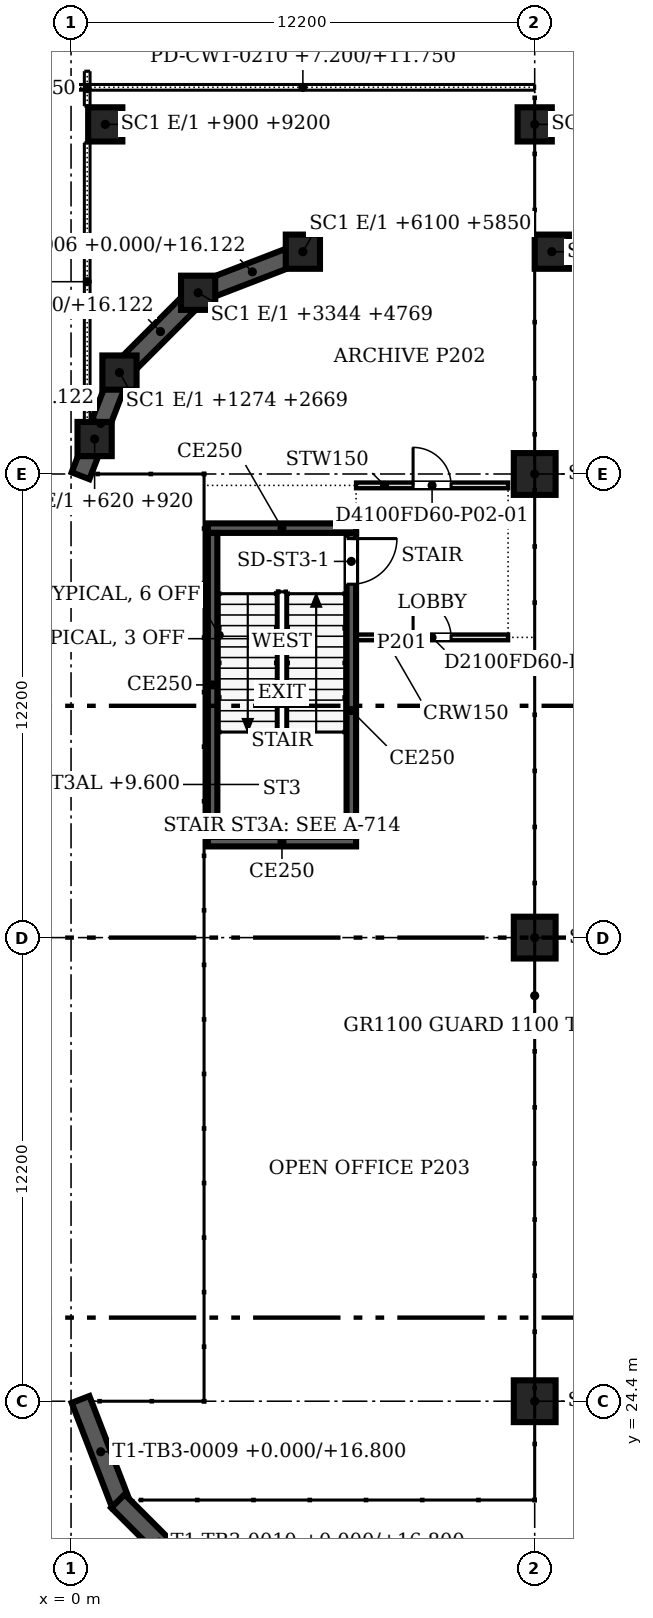
"""IFC4 building model, lengths in metres.
Left out: names, types, materials, properties, quantities, classifications, styles, units other than length and angle.
Written with IfcOpenShell. Run it as: python <this file> out.ifc"""

import sys

from ifc_helpers import new_model, si_unit, direction, frame, frame_2d, origin, origin_2d, place, context, subcontext, project, spatial, polyline, rectangle, outline, extrude, faceted_brep, source, transform, mapped, element, fill, save


model = new_model("IFC4")
c1 = context("Model", 3, precision=1e-05, world=origin(), true_north=direction((0.0, 1.0)))
c2 = subcontext(c1, "Body", "Model", "MODEL_VIEW")
j1 = project(units=[si_unit("LENGTHUNIT", "METRE"), si_unit("PLANEANGLEUNIT", "RADIAN")], contexts=[c1])
p1 = place(None, origin())
s1 = spatial("IfcSite", under=j1, at=p1, CompositionType="ELEMENT")
p2 = place(p1, origin())
s2 = spatial("IfcBuilding", under=s1, at=p2, CompositionType="ELEMENT")
p3 = place(p2, frame((0.0, 0.0, 7.2)))
s3 = spatial("IfcBuildingStorey", under=s2, at=p3, CompositionType="ELEMENT", Elevation=7.2)
for number, where, z_axis, x_axis in (
    (1, (12.65, 54.65, 0.0), (0.0, 0.0, 1.0), (1.0, 0.0, 0.0)),
    (2, (6.1, 54.65, 0.0), (0.0, 0.0, 1.0), (1.0, 0.0, 0.0)),
    (3, (3.344, 53.569, 0.0), (0.0, 0.0, 1.0), (1.0, 0.0, 0.0)),
    (4, (1.274, 51.469, 0.0), (0.0, 0.0, 1.0), (1.0, 0.0, 0.0)),
):
    element("IfcColumn", number, at=place(p3, frame(where, z_axis=z_axis, x_axis=x_axis)), inside=s3, PredefinedType="COLUMN", context=c2, shape_type="SweptSolid", body=[
        extrude(rectangle(XDim=0.9, YDim=0.9, at=origin_2d()), origin(), (0.0, 0.0, 1.0), 4.55),
    ])
for number, where, z_axis, x_axis in (
    (5, (12.2, 24.4, 0.0), (0.0, 0.0, 1.0), (1.0, 0.0, 0.0)),
    (6, (12.2, 36.6, 0.0), (0.0, 0.0, 1.0), (1.0, 0.0, 0.0)),
    (7, (12.2, 48.8, 0.0), (0.0, 0.0, 1.0), (1.0, 0.0, 0.0)),
):
    element("IfcColumn", number, at=place(p3, frame(where, z_axis=z_axis, x_axis=x_axis)), inside=s3, PredefinedType="COLUMN", context=c2, shape_type="SweptSolid", body=[
        extrude(rectangle(XDim=1.1, YDim=1.1, at=origin_2d()), origin(), (0.0, 0.0, 1.0), 4.55),
    ])
for number, where, z_axis, x_axis in (
    (8, (12.2, 58.0, 0.0), (0.0, 0.0, 1.0), (1.0, 0.0, 0.0)),
    (9, (0.9, 58.0, 0.0), (0.0, 0.0, 1.0), (1.0, 0.0, 0.0)),
    (10, (0.62, 49.72, 0.0), (0.0, 0.0, 1.0), (1.0, 0.0, 0.0)),
):
    element("IfcColumn", number, at=place(p3, frame(where, z_axis=z_axis, x_axis=x_axis)), inside=s3, PredefinedType="COLUMN", context=c2, shape_type="SweptSolid", body=[
        extrude(rectangle(XDim=0.9, YDim=0.9, at=origin_2d()), origin(), (0.0, 0.0, 1.0), 4.55),
    ])
p4 = place(p2, frame((0.0, 0.0, 12.0)))
s4 = spatial("IfcBuildingStorey", under=s2, at=p4, CompositionType="ELEMENT", Elevation=12.0)
m1 = source(origin(), c2, "Body", "Brep", [
    faceted_brep([(0.047, -0.25, 0.0), (6.1, -0.25, 8.4), (0.0, -0.25, 8.4), (0.0, -0.25, 0.066), (0.093, 0.25, 8.4), (6.1, 0.25, 8.4), (0.093, 0.25, 0.065), (0.047, 0.0, 0.0)], [[[0, 1, 2, 3]], [[4, 5, 6]], [[6, 5, 1, 0, 7]], [[5, 4, 2, 1]], [[7, 0, 3]], [[6, 7, 3, 2, 4]]]),
])
p5 = place(p4, frame((0.25, 48.8, -3.6), z_axis=(0.0, 0.0, 1.0), x_axis=(0.0, -1.0, 0.0)))
e11 = element("IfcWall", 11, at=p5, inside=s4, PredefinedType="SOLIDWALL", context=c2, shape_type="MappedRepresentation", body=[
    mapped(m1, transform((0.0, 0.0, 0.0), scale=1.0)),
])
m2 = source(origin(), c2, "Body", "SweptSolid", [
    extrude(outline(polyline([(0.247, 0.705), (5.612, 8.15), (0.247, 8.15), (0.247, 0.705)])), frame((0.0, 0.26, 0.0), z_axis=(0.0, -1.0, 0.0), x_axis=(1.0, 0.0, 0.0)), (0.0, 0.0, 1.0), 0.52),
])
p6 = place(p5, origin())
e12 = element("IfcOpeningElement", 12, at=p6, cuts=e11, PredefinedType="OPENING", context=c2, shape_type="MappedRepresentation", body=[
    mapped(m2, transform((0.0, 0.0, 0.0), scale=1.0)),
])
m3 = source(origin(), c2, "Body", "SweptSolid", [
    extrude(outline(polyline([(6.1, 0.0), (12.2, 8.4), (0.0, 8.4), (6.1, 0.0)])), frame((0.0, 0.25, 0.0), z_axis=(0.0, -1.0, 0.0), x_axis=(1.0, 0.0, 0.0)), (0.0, 0.0, 1.0), 0.5),
])
p7 = place(p4, frame((0.25, 42.7, -3.6), z_axis=(0.0, 0.0, 1.0), x_axis=(0.0, -1.0, 0.0)))
e13 = element("IfcWall", 13, at=p7, inside=s4, PredefinedType="SOLIDWALL", context=c2, shape_type="MappedRepresentation", body=[
    mapped(m3, transform((0.0, 0.0, 0.0), scale=1.0)),
])
m4 = source(origin(), c2, "Body", "SweptSolid", [
    extrude(outline(polyline([(6.1, 0.426), (11.709, 8.15), (0.49, 8.15), (6.1, 0.426)])), frame((0.0, 0.26, 0.0), z_axis=(0.0, -1.0, 0.0), x_axis=(1.0, 0.0, 0.0)), (0.0, 0.0, 1.0), 0.52),
])
p8 = place(p7, origin())
e14 = element("IfcOpeningElement", 14, at=p8, cuts=e13, PredefinedType="OPENING", context=c2, shape_type="MappedRepresentation", body=[
    mapped(m4, transform((0.0, 0.0, 0.0), scale=1.0)),
])
m5 = source(origin(), c2, "Body", "Brep", [
    faceted_brep([(6.053, -0.25, 0.0), (6.1, -0.25, 0.066), (6.1, -0.25, 8.4), (0.0, -0.25, 8.4), (0.0, 0.25, 8.4), (6.007, 0.25, 8.4), (6.007, 0.25, 0.065), (6.053, 0.0, 0.0)], [[[0, 1, 2, 3]], [[4, 5, 6]], [[1, 0, 7]], [[5, 4, 3, 2]], [[4, 6, 7, 0, 3]], [[1, 7, 6, 5, 2]]]),
])
p9 = place(p4, frame((0.25, 30.5, -3.6), z_axis=(0.0, 0.0, 1.0), x_axis=(0.0, -1.0, 0.0)))
e15 = element("IfcWall", 15, at=p9, inside=s4, PredefinedType="SOLIDWALL", context=c2, shape_type="MappedRepresentation", body=[
    mapped(m5, transform((0.0, 0.0, 0.0), scale=1.0)),
])
m6 = source(origin(), c2, "Body", "SweptSolid", [
    extrude(outline(polyline([(5.854, 8.15), (0.488, 8.15), (5.854, 0.705), (5.854, 8.15)])), frame((0.0, 0.26, 0.0), z_axis=(0.0, -1.0, 0.0), x_axis=(1.0, 0.0, 0.0)), (0.0, 0.0, 1.0), 0.52),
])
p10 = place(p9, origin())
e16 = element("IfcOpeningElement", 16, at=p10, cuts=e15, PredefinedType="OPENING", context=c2, shape_type="MappedRepresentation", body=[
    mapped(m6, transform((0.0, 0.0, 0.0), scale=1.0)),
])
m7 = source(origin(), c2, "Body", "Brep", [
    faceted_brep([(6.1, -0.25, 0.0), (0.0, -0.25, 8.4), (0.0, -0.25, 7.549), (5.482, -0.25, 0.0), (6.1, -0.25, 0.0), (5.482, 0.25, 0.0), (0.0, 0.25, 7.549), (0.0, 0.25, 8.4), (6.1, 0.25, 0.0), (6.1, 0.25, 0.0)], [[[0, 1, 2, 3, 4]], [[5, 6, 7, 8, 9]], [[8, 7, 1, 0]], [[7, 6, 2, 1]], [[6, 5, 3, 2]], [[5, 9, 4, 3]], [[4, 9, 8, 0]]]),
])
p11 = place(p4, frame((0.25, 42.7, -3.6), z_axis=(0.0, 0.0, 1.0), x_axis=(0.0, -1.0, 0.0)))
e17 = element("IfcWall", 17, at=p11, inside=s4, PredefinedType="SOLIDWALL", context=c2, shape_type="MappedRepresentation", body=[
    mapped(m7, transform((0.0, 0.0, 0.0), scale=1.0)),
])
m8 = source(origin(), c2, "Body", "Brep", [
    faceted_brep([(6.053, -0.25, 8.4), (0.0, -0.25, 0.0), (0.613, -0.25, 0.0), (6.053, -0.25, 7.549), (6.053, 0.25, 7.549), (0.613, 0.25, 0.0), (0.047, 0.25, 0.0), (0.047, 0.25, 0.065), (6.053, 0.25, 8.4), (0.0, 0.0, 0.0)], [[[0, 1, 2, 3]], [[4, 5, 6, 7, 8]], [[8, 7, 9, 1, 0]], [[6, 5, 2, 1, 9]], [[5, 4, 3, 2]], [[6, 9, 7]], [[3, 4, 8, 0]]]),
])
p12 = place(p4, frame((0.25, 48.753, -3.6), z_axis=(0.0, 0.0, 1.0), x_axis=(0.0, -1.0, 0.0)))
e18 = element("IfcWall", 18, at=p12, inside=s4, PredefinedType="SOLIDWALL", context=c2, shape_type="MappedRepresentation", body=[
    mapped(m8, transform((0.0, 0.0, 0.0), scale=1.0)),
])
m9 = source(origin(), c2, "Body", "Brep", [
    faceted_brep([(6.053, -0.25, 0.0), (0.0, -0.25, 8.4), (0.0, -0.25, 7.549), (5.44, -0.25, 0.0), (5.44, 0.25, 0.0), (0.0, 0.25, 7.549), (0.0, 0.25, 8.4), (6.007, 0.25, 0.065), (6.007, 0.25, 0.0), (6.053, 0.0, 0.0)], [[[0, 1, 2, 3]], [[4, 5, 6, 7, 8]], [[7, 6, 1, 0, 9]], [[6, 5, 2, 1]], [[5, 4, 3, 2]], [[4, 8, 9, 0, 3]], [[9, 8, 7]]]),
])
p13 = place(p4, frame((0.25, 30.5, -3.6), z_axis=(0.0, 0.0, 1.0), x_axis=(0.0, -1.0, 0.0)))
e19 = element("IfcWall", 19, at=p13, inside=s4, PredefinedType="SOLIDWALL", context=c2, shape_type="MappedRepresentation", body=[
    mapped(m9, transform((0.0, 0.0, 0.0), scale=1.0)),
])
m10 = source(origin(), c2, "Body", "SweptSolid", [
    extrude(outline(polyline([(6.1, 8.4), (0.0, 0.0), (0.618, 0.0), (6.1, 7.549), (6.1, 8.4)])), frame((0.0, 0.25, 0.0), z_axis=(0.0, -1.0, 0.0), x_axis=(1.0, 0.0, 0.0)), (0.0, 0.0, 1.0), 0.5),
])
p14 = place(p4, frame((0.25, 36.6, -3.6), z_axis=(0.0, 0.0, 1.0), x_axis=(0.0, -1.0, 0.0)))
e20 = element("IfcWall", 20, at=p14, inside=s4, PredefinedType="SOLIDWALL", context=c2, shape_type="MappedRepresentation", body=[
    mapped(m10, transform((0.0, 0.0, 0.0), scale=1.0)),
])
m11 = source(origin(), c2, "Body", "Brep", [
    faceted_brep([(0.0, -0.25, 0.0), (2.95, -0.25, 0.0), (2.95, -0.25, 16.122), (0.0, -0.25, 16.122), (0.047, 0.25, 16.122), (2.898, 0.25, 16.122), (2.898, 0.25, 0.0), (0.047, 0.25, 0.0), (2.95, 0.0, 0.0), (0.0, 0.0, 0.0), (2.95, 0.0, 16.122), (0.0, 0.0, 16.122)], [[[0, 1, 2, 3]], [[4, 5, 6, 7]], [[7, 6, 8, 1, 0, 9]], [[10, 2, 1, 8]], [[5, 4, 11, 3, 2, 10]], [[9, 0, 3, 11]], [[7, 9, 11, 4]], [[8, 6, 5, 10]]]),
])
p15 = place(p3, frame((6.146, 54.65, -7.2), z_axis=(0.0, 0.0, 1.0), x_axis=(-0.932999673775, -0.359877213415, 0.0)))
e21 = element("IfcWall", 21, at=p15, inside=s3, PredefinedType="SOLIDWALL", context=c2, shape_type="MappedRepresentation", body=[
    mapped(m11, transform((0.0, 0.0, 0.0), scale=1.0)),
])
m12 = source(origin(), c2, "Body", "Brep", [
    faceted_brep([(0.0, -0.25, 0.0), (2.944, -0.25, 0.0), (2.944, -0.25, 16.122), (0.0, -0.25, 16.122), (0.053, 0.25, 16.122), (2.891, 0.25, 16.122), (2.891, 0.25, 0.0), (0.053, 0.25, 0.0), (2.944, 0.0, 0.0), (0.0, 0.0, 0.0), (2.944, 0.0, 16.122), (0.0, 0.0, 16.122)], [[[0, 1, 2, 3]], [[4, 5, 6, 7]], [[7, 6, 8, 1, 0, 9]], [[10, 2, 1, 8]], [[5, 4, 11, 3, 2, 10]], [[9, 0, 3, 11]], [[7, 9, 11, 4]], [[8, 6, 5, 10]]]),
])
p16 = place(p3, frame((3.394, 53.588, -7.2), z_axis=(0.0, 0.0, 1.0), x_axis=(-0.707106781187, -0.707106781187, 0.0)))
e22 = element("IfcWall", 22, at=p16, inside=s3, PredefinedType="SOLIDWALL", context=c2, shape_type="MappedRepresentation", body=[
    mapped(m12, transform((0.0, 0.0, 0.0), scale=1.0)),
])
m13 = source(origin(), c2, "Body", "Brep", [
    faceted_brep([(0.0, -0.25, 0.0), (2.95, -0.25, 0.0), (2.95, -0.25, 16.122), (0.0, -0.25, 16.122), (0.053, 0.25, 16.122), (2.904, 0.25, 16.122), (2.904, 0.25, 0.0), (0.053, 0.25, 0.0), (2.95, 0.0, 0.0), (0.0, 0.0, 0.0), (2.95, 0.0, 16.122), (0.0, 0.0, 16.122)], [[[0, 1, 2, 3]], [[4, 5, 6, 7]], [[7, 6, 8, 1, 0, 9]], [[10, 2, 1, 8]], [[5, 4, 11, 3, 2, 10]], [[9, 0, 3, 11]], [[7, 9, 11, 4]], [[8, 6, 5, 10]]]),
])
p17 = place(p3, frame((1.312, 51.506, -7.2), z_axis=(0.0, 0.0, 1.0), x_axis=(-0.359921456299, -0.932982607178, 0.0)))
e23 = element("IfcWall", 23, at=p17, inside=s3, PredefinedType="SOLIDWALL", context=c2, shape_type="MappedRepresentation", body=[
    mapped(m13, transform((0.0, 0.0, 0.0), scale=1.0)),
])
m14 = source(origin(), c2, "Body", "Brep", [
    faceted_brep([(0.0, -0.25, 0.0), (2.95, -0.25, 0.0), (2.95, -0.25, 16.8), (0.0, -0.25, 16.8), (0.047, 0.25, 16.8), (2.898, 0.25, 16.8), (2.898, 0.25, 0.0), (0.047, 0.25, 0.0), (2.95, 0.0, 0.0), (0.0, 0.0, 0.0), (2.95, 0.0, 16.8), (0.0, 0.0, 16.8)], [[[0, 1, 2, 3]], [[4, 5, 6, 7]], [[7, 6, 8, 1, 0, 9]], [[10, 2, 1, 8]], [[5, 4, 11, 3, 2, 10]], [[9, 0, 3, 11]], [[7, 9, 11, 4]], [[8, 6, 5, 10]]]),
])
p18 = place(p3, frame((0.25, 24.447, -7.2), z_axis=(0.0, 0.0, 1.0), x_axis=(0.359877213415, -0.932999673775, 0.0)))
e24 = element("IfcWall", 24, at=p18, inside=s3, PredefinedType="SOLIDWALL", context=c2, shape_type="MappedRepresentation", body=[
    mapped(m14, transform((0.0, 0.0, 0.0), scale=1.0)),
])
m15 = source(origin(), c2, "Body", "Brep", [
    faceted_brep([(0.0, -0.25, 0.0), (3.055, -0.25, 0.0), (3.055, -0.25, 16.8), (0.0, -0.25, 16.8), (0.0, 0.25, 16.8), (3.002, 0.25, 16.8), (3.002, 0.25, 0.0), (0.0, 0.25, 0.0), (3.055, 0.0, 0.0), (3.055, 0.0, 16.8)], [[[0, 1, 2, 3]], [[4, 5, 6, 7]], [[7, 6, 8, 1, 0]], [[9, 2, 1, 8]], [[5, 4, 3, 2, 9]], [[4, 7, 0, 3]], [[8, 6, 5, 9]]]),
])
p19 = place(p3, frame((1.234, 21.772, -7.2), z_axis=(0.0, 0.0, 1.0), x_axis=(0.707146740881, -0.707066819233, 0.0)))
e25 = element("IfcWall", 25, at=p19, inside=s3, PredefinedType="SOLIDWALL", context=c2, shape_type="MappedRepresentation", body=[
    mapped(m15, transform((0.0, 0.0, 0.0), scale=1.0)),
])
p20 = place(p3, frame((7.5, 39.125, 0.0), z_axis=(0.0, 0.0, 1.0), x_axis=(-1.0, 0.0, 0.0)))
e26 = element("IfcWall", 26, at=p20, inside=s3, PredefinedType="SOLIDWALL", context=c2, shape_type="SweptSolid", body=[
    extrude(rectangle(XDim=3.9, YDim=0.25, at=frame_2d((1.95, 0.0))), origin(), (0.0, 0.0, 1.0), 4.8),
])
p21 = place(p3, frame((3.725, 39.25, 0.0), z_axis=(0.0, 0.0, 1.0), x_axis=(0.0, 1.0, 0.0)))
e27 = element("IfcWall", 27, at=p21, inside=s3, PredefinedType="SOLIDWALL", context=c2, shape_type="SweptSolid", body=[
    extrude(rectangle(XDim=8.0, YDim=0.25, at=frame_2d((4.0, 0.0))), origin(), (0.0, 0.0, 1.0), 4.8),
])
p22 = place(p3, frame((3.6, 47.375, 0.0), z_axis=(0.0, 0.0, 1.0), x_axis=(1.0, 0.0, 0.0)))
e28 = element("IfcWall", 28, at=p22, inside=s3, PredefinedType="SOLIDWALL", context=c2, shape_type="SweptSolid", body=[
    extrude(rectangle(XDim=3.9, YDim=0.25, at=frame_2d((1.95, 0.0))), origin(), (0.0, 0.0, 1.0), 4.8),
])
p23 = place(p3, frame((7.375, 47.25, 0.0), z_axis=(0.0, 0.0, 1.0), x_axis=(0.0, -1.0, 0.0)))
e29 = element("IfcWall", 29, at=p23, inside=s3, PredefinedType="SOLIDWALL", context=c2, shape_type="SweptSolid", body=[
    extrude(rectangle(XDim=8.0, YDim=0.25, at=frame_2d((4.0, 0.0))), origin(), (0.0, 0.0, 1.0), 4.8),
])
m16 = source(origin(), c2, "Body", "SweptSolid", [
    extrude(rectangle(XDim=1.2, YDim=2.1, at=frame_2d((0.6, 1.05))), frame((0.0, 0.135, 0.0), z_axis=(0.0, -1.0, 0.0), x_axis=(1.0, 0.0, 0.0)), (0.0, 0.0, 1.0), 0.27),
])
p24 = place(p23, frame((0.15, 0.0, 0.0)))
e30 = element("IfcOpeningElement", 30, at=p24, cuts=e29, PredefinedType="OPENING", context=c2, shape_type="MappedRepresentation", body=[
    mapped(m16, transform((0.0, 0.0, 0.0), scale=1.0)),
])
p25 = place(p3, frame((11.5, 44.5, 0.0), z_axis=(0.0, 0.0, 1.0), x_axis=(-1.0, 0.0, 0.0)))
e31 = element("IfcWall", 31, at=p25, inside=s3, PredefinedType="PARTITIONING", context=c2, shape_type="SweptSolid", body=[
    extrude(rectangle(XDim=4.0, YDim=0.15, at=frame_2d((2.0, 0.0))), origin(), (0.0, 0.0, 1.0), 3.715),
])
m17 = source(origin(), c2, "Body", "SweptSolid", [
    extrude(rectangle(XDim=1.0, YDim=2.1, at=frame_2d((0.5, 1.05))), frame((0.0, 0.085, 0.0), z_axis=(0.0, -1.0, 0.0), x_axis=(1.0, 0.0, 0.0)), (0.0, 0.0, 1.0), 0.17),
])
p26 = place(p25, frame((1.5, 0.0, 0.0)))
e32 = element("IfcOpeningElement", 32, at=p26, cuts=e31, PredefinedType="OPENING", context=c2, shape_type="MappedRepresentation", body=[
    mapped(m17, transform((0.0, 0.0, 0.0), scale=1.0)),
])
p27 = place(p3, frame((7.5, 48.5, 0.0), z_axis=(0.0, 0.0, 1.0), x_axis=(1.0, 0.0, 0.0)))
e33 = element("IfcWall", 33, at=p27, inside=s3, PredefinedType="PARTITIONING", context=c2, shape_type="SweptSolid", body=[
    extrude(rectangle(XDim=4.0, YDim=0.15, at=frame_2d((2.0, 0.0))), origin(), (0.0, 0.0, 1.0), 3.715),
])
p28 = place(p27, frame((1.5, 0.0, 0.0)))
e34 = element("IfcOpeningElement", 34, at=p28, cuts=e33, PredefinedType="OPENING", context=c2, shape_type="MappedRepresentation", body=[
    mapped(m17, transform((0.0, 0.0, 0.0), scale=1.0)),
])
m18 = source(origin(), c2, "Body", "SweptSolid", [
    extrude(rectangle(XDim=1.2, YDim=2.1, at=frame_2d((0.6, 1.05))), frame((0.0, 0.025, 0.0), z_axis=(0.0, -1.0, 0.0), x_axis=(1.0, 0.0, 0.0)), (0.0, 0.0, 1.0), 0.05),
])
p29 = place(p24, origin())
e35 = element("IfcDoor", 35, at=p29, inside=s3, OperationType="SINGLE_SWING_LEFT", PredefinedType="DOOR", context=c2, shape_type="MappedRepresentation", body=[
    mapped(m18, transform((0.0, 0.0, 0.0), scale=1.0)),
])
fill(e30, e35)
m19 = source(origin(), c2, "Body", "SweptSolid", [
    extrude(rectangle(XDim=1.0, YDim=2.1, at=frame_2d((0.5, 1.05))), frame((0.0, 0.025, 0.0), z_axis=(0.0, -1.0, 0.0), x_axis=(1.0, 0.0, 0.0)), (0.0, 0.0, 1.0), 0.05),
])
p30 = place(p28, origin())
e36 = element("IfcDoor", 36, at=p30, inside=s3, OperationType="SINGLE_SWING_LEFT", PredefinedType="DOOR", context=c2, shape_type="MappedRepresentation", body=[
    mapped(m19, transform((0.0, 0.0, 0.0), scale=1.0)),
])
fill(e34, e36)
p31 = place(p26, origin())
e37 = element("IfcDoor", 37, at=p31, inside=s3, OperationType="SINGLE_SWING_RIGHT", PredefinedType="DOOR", context=c2, shape_type="MappedRepresentation", body=[
    mapped(m19, transform((0.0, 0.0, 0.0), scale=1.0)),
])
fill(e32, e37)
save(model, sys.argv[1])
